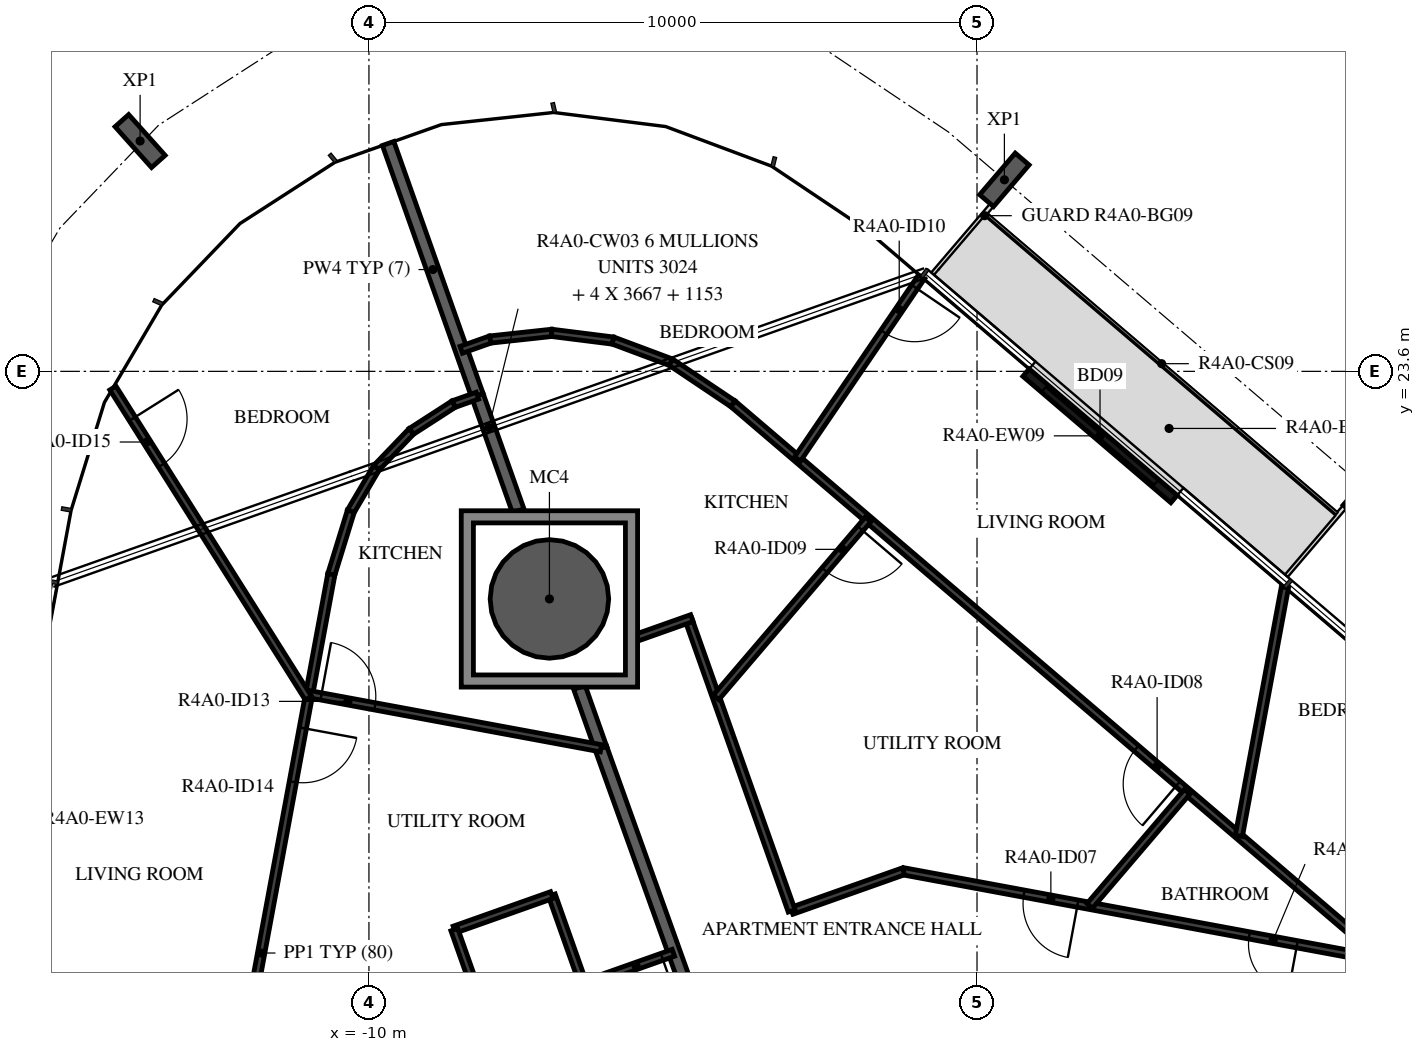
"""IFC4 building model, lengths in metres.
Left out: names, types, materials, properties, quantities, classifications, styles, units other than length and angle.
Written with IfcOpenShell. Run it as: python <this file> out.ifc"""

import sys

from ifc_helpers import new_model, si_unit, direction, frame, frame_2d, origin, origin_2d, place, context, subcontext, project, spatial, polyline, rectangle, hollow_circle, i_section, outline, extrude, element, fill, save


model = new_model("IFC4")
c1 = context("Model", 3, precision=1e-05, world=origin(), true_north=direction((0.0, 1.0)))
c2 = subcontext(c1, "Body", "Model", "MODEL_VIEW")
j1 = project(units=[si_unit("LENGTHUNIT", "METRE"), si_unit("PLANEANGLEUNIT", "RADIAN")], contexts=[c1])
p1 = place(None, origin())
s1 = spatial("IfcSite", under=j1, at=p1, CompositionType="ELEMENT")
p2 = place(p1, origin())
s2 = spatial("IfcBuilding", under=s1, at=p2, CompositionType="ELEMENT")
p3 = place(p2, frame((0.0, 0.0, 158.7)))
s3 = spatial("IfcBuildingStorey", under=s2, at=p3, CompositionType="ELEMENT", Elevation=158.7)
p4 = place(p3, frame((-7.032, 19.858, -0.38), z_axis=(0.0, 0.0, 1.0), x_axis=(1.0, 0.0, 0.0)))
e1 = element("IfcColumn", 1, at=p4, inside=s3, PredefinedType="COLUMN", context=c2, shape_type="SweptSolid", body=[
    extrude(hollow_circle(Radius=0.975, WallThickness=0.045, at=origin_2d()), origin(), (0.0, 0.0, 1.0), 3.5),
])
for number, where, z_axis, x_axis in (
    (2, (6.427, 21.645, -0.38), (0.0, 0.0, 1.0), (0.76, -0.649, 0.0)),
    (3, (0.45, 26.75, -0.38), (0.0, 0.0, 1.0), (0.76, -0.649, 0.0)),
    (4, (-13.763, 27.387, -0.38), (0.0, 0.0, 1.0), (0.746, 0.666, 0.0)),
):
    element("IfcColumn", number, at=place(p3, frame(where, z_axis=z_axis, x_axis=x_axis)), inside=s3, PredefinedType="COLUMN", context=c2, shape_type="SweptSolid", body=[
        extrude(i_section(OverallWidth=0.3, OverallDepth=0.9, WebThickness=0.019, FlangeThickness=0.035, FilletRadius=0.03, at=origin_2d()), origin(), (0.0, 0.0, 1.0), 3.5),
    ])
p5 = place(p3, frame((3.24, 21.5, 0.0), z_axis=(0.0, 0.0, 1.0), x_axis=(-0.760429407868, 0.649420599957, 0.0)))
e5 = element("IfcWall", 5, at=p5, inside=s3, PredefinedType="STANDARD", context=c2, shape_type="SweptSolid", body=[
    extrude(rectangle(XDim=3.2, YDim=0.16, at=frame_2d((1.6, 0.0))), origin(), (0.0, 0.0, 1.0), 3.12),
])
p6 = place(p5, frame((0.4, 0.0, 0.0)))
e6 = element("IfcOpeningElement", 6, at=p6, cuts=e5, PredefinedType="OPENING", context=c2, shape_type="SweptSolid", body=[
    extrude(rectangle(XDim=2.4, YDim=2.4, at=frame_2d((1.2, 1.2))), frame((0.0, 0.09, 0.0), z_axis=(0.0, -1.0, 0.0), x_axis=(1.0, 0.0, 0.0)), (0.0, 0.0, 1.0), 0.18),
])
p7 = place(p3, frame((-6.185, 17.402, 0.0), z_axis=(0.0, 0.0, 1.0), x_axis=(0.337736730281, -0.941240618024, 0.0)))
e7 = element("IfcWall", 7, at=p7, inside=s3, PredefinedType="STANDARD", context=c2, shape_type="SweptSolid", body=[
    extrude(rectangle(XDim=5.068, YDim=0.2, at=frame_2d((2.534, 0.0))), origin(), (0.0, 0.0, 1.0), 3.12),
])
p8 = place(p3, frame((-6.539, 18.403, 0.0), z_axis=(0.0, 0.0, 1.0), x_axis=(0.333625806098, -0.942705585804, 0.0)))
e8 = element("IfcWall", 8, at=p8, inside=s3, PredefinedType="STANDARD", context=c2, shape_type="SweptSolid", body=[
    extrude(rectangle(XDim=1.062, YDim=0.2, at=frame_2d((0.531, 0.0))), origin(), (0.0, 0.0, 1.0), 3.12),
])
p9 = place(p3, frame((-9.684, 27.348, 0.0), z_axis=(0.0, 0.0, 1.0), x_axis=(0.333818381408, -0.942637410797, 0.0)))
e9 = element("IfcWall", 9, at=p9, inside=s3, PredefinedType="STANDARD", context=c2, shape_type="SweptSolid", body=[
    extrude(rectangle(XDim=4.4, YDim=0.2, at=frame_2d((2.2, 0.0))), origin(), (0.0, 0.0, 1.0), 3.12),
])
p10 = place(p3, frame((-8.216, 23.2, 0.0), z_axis=(0.0, 0.0, 1.0), x_axis=(0.333793117913, -0.942646357036, 0.0)))
e10 = element("IfcWall", 10, at=p10, inside=s3, PredefinedType="STANDARD", context=c2, shape_type="SweptSolid", body=[
    extrude(rectangle(XDim=2.008, YDim=0.2, at=frame_2d((1.004, 0.0))), origin(), (0.0, 0.0, 1.0), 3.12),
])
p11 = place(p3, frame((8.702, 12.206, 0.0), z_axis=(0.0, 0.0, 1.0), x_axis=(-0.760401313718, 0.649453494945, 0.0)))
e11 = element("IfcWall", 11, at=p11, inside=s3, PredefinedType="PARTITIONING", context=c2, shape_type="SweptSolid", body=[
    extrude(rectangle(XDim=16.724, YDim=0.12, at=frame_2d((8.362, 0.0))), origin(), (0.0, 0.0, 1.0), 3.12),
])
p12 = place(p11, frame((0.2, 0.0, 0.0)))
e12 = element("IfcOpeningElement", 12, at=p12, cuts=e11, PredefinedType="OPENING", context=c2, shape_type="SweptSolid", body=[
    extrude(rectangle(XDim=0.9, YDim=2.1, at=frame_2d((0.45, 1.05))), frame((0.0, 0.07, 0.0), z_axis=(0.0, -1.0, 0.0), x_axis=(1.0, 0.0, 0.0)), (0.0, 0.0, 1.0), 0.14),
])
p13 = place(p11, frame((7.099, 0.0, 0.0)))
e13 = element("IfcOpeningElement", 13, at=p13, cuts=e11, PredefinedType="OPENING", context=c2, shape_type="SweptSolid", body=[
    extrude(rectangle(XDim=0.9, YDim=2.1, at=frame_2d((0.45, 1.05))), frame((0.0, 0.07, 0.0), z_axis=(0.0, -1.0, 0.0), x_axis=(1.0, 0.0, 0.0)), (0.0, 0.0, 1.0), 0.14),
])
p14 = place(p3, frame((6.641, 13.923, 0.0), z_axis=(0.0, 0.0, 1.0), x_axis=(-0.983250157272, 0.182261153912, 0.0)))
e14 = element("IfcWall", 14, at=p14, inside=s3, PredefinedType="PARTITIONING", context=c2, shape_type="SweptSolid", body=[
    extrude(rectangle(XDim=7.985, YDim=0.12, at=frame_2d((3.992, 0.0))), origin(), (0.0, 0.0, 1.0), 3.12),
])
p15 = place(p14, frame((1.4, 0.0, 0.0)))
e15 = element("IfcOpeningElement", 15, at=p15, cuts=e14, PredefinedType="OPENING", context=c2, shape_type="SweptSolid", body=[
    extrude(rectangle(XDim=0.8, YDim=2.1, at=frame_2d((0.4, 1.05))), frame((0.0, 0.07, 0.0), z_axis=(0.0, -1.0, 0.0), x_axis=(1.0, 0.0, 0.0)), (0.0, 0.0, 1.0), 0.14),
])
p16 = place(p14, frame((5.069, 0.0, 0.0)))
e16 = element("IfcOpeningElement", 16, at=p16, cuts=e14, PredefinedType="OPENING", context=c2, shape_type="SweptSolid", body=[
    extrude(rectangle(XDim=0.9, YDim=2.1, at=frame_2d((0.45, 1.05))), frame((0.0, 0.07, 0.0), z_axis=(0.0, -1.0, 0.0), x_axis=(1.0, 0.0, 0.0)), (0.0, 0.0, 1.0), 0.14),
])
p17 = place(p3, frame((-1.21, 15.378, 0.0), z_axis=(0.0, 0.0, 1.0), x_axis=(-0.942633792474, -0.333828598663, 0.0)))
e17 = element("IfcWall", 17, at=p17, inside=s3, PredefinedType="PARTITIONING", context=c2, shape_type="SweptSolid", body=[
    extrude(rectangle(XDim=1.95, YDim=0.12, at=frame_2d((0.975, 0.0))), origin(), (0.0, 0.0, 1.0), 3.12),
])
p18 = place(p3, frame((-3.048, 14.727, 0.0), z_axis=(0.0, 0.0, 1.0), x_axis=(-0.333811603187, 0.942639811157, 0.0)))
e18 = element("IfcWall", 18, at=p18, inside=s3, PredefinedType="PARTITIONING", context=c2, shape_type="SweptSolid", body=[
    extrude(rectangle(XDim=5.087, YDim=0.12, at=frame_2d((2.543, 0.0))), origin(), (0.0, 0.0, 1.0), 3.12),
])
p19 = place(p3, frame((-4.689, 19.542, 0.0), z_axis=(0.0, 0.0, 1.0), x_axis=(-0.942661851862, -0.33374935662, 0.0)))
e19 = element("IfcWall", 19, at=p19, inside=s3, PredefinedType="PARTITIONING", context=c2, shape_type="SweptSolid", body=[
    extrude(rectangle(XDim=1.017, YDim=0.12, at=frame_2d((0.508, 0.0))), origin(), (0.0, 0.0, 1.0), 3.12),
])
p20 = place(p3, frame((5.063, 20.048, 0.0), z_axis=(0.0, 0.0, 1.0), x_axis=(-0.182238575099, -0.983254342348, 0.0)))
e20 = element("IfcWall", 20, at=p20, inside=s3, PredefinedType="PARTITIONING", context=c2, shape_type="SweptSolid", body=[
    extrude(rectangle(XDim=4.157, YDim=0.12, at=frame_2d((2.079, 0.0))), origin(), (0.0, 0.0, 1.0), 3.12),
])
p21 = place(p3, frame((3.456, 16.686, 0.0), z_axis=(0.0, 0.0, 1.0), x_axis=(-0.649462010463, -0.760394040591, 0.0)))
e21 = element("IfcWall", 21, at=p21, inside=s3, PredefinedType="PARTITIONING", context=c2, shape_type="SweptSolid", body=[
    extrude(rectangle(XDim=2.467, YDim=0.12, at=frame_2d((1.233, 0.0))), origin(), (0.0, 0.0, 1.0), 3.12),
])
p22 = place(p3, frame((-0.914, 25.153, 0.0), z_axis=(0.0, 0.0, 1.0), x_axis=(-0.56264004133, -0.826701992191, 0.0)))
e22 = element("IfcWall", 22, at=p22, inside=s3, PredefinedType="PARTITIONING", context=c2, shape_type="SweptSolid", body=[
    extrude(rectangle(XDim=3.622, YDim=0.12, at=frame_2d((1.811, 0.0))), origin(), (0.0, 0.0, 1.0), 2.73),
])
p23 = place(p22, frame((0.2, 0.0, 0.0)))
e23 = element("IfcOpeningElement", 23, at=p23, cuts=e22, PredefinedType="OPENING", context=c2, shape_type="SweptSolid", body=[
    extrude(rectangle(XDim=0.9, YDim=2.1, at=frame_2d((0.45, 1.05))), frame((0.0, 0.07, 0.0), z_axis=(0.0, -1.0, 0.0), x_axis=(1.0, 0.0, 0.0)), (0.0, 0.0, 1.0), 0.14),
])
p24 = place(p3, frame((-1.79, 21.167, 0.0), z_axis=(0.0, 0.0, 1.0), x_axis=(-0.649427819186, -0.760423242456, 0.0)))
e24 = element("IfcWall", 24, at=p24, inside=s3, PredefinedType="PARTITIONING", context=c2, shape_type="SweptSolid", body=[
    extrude(rectangle(XDim=3.851, YDim=0.12, at=frame_2d((1.926, 0.0))), origin(), (0.0, 0.0, 1.0), 3.12),
])
p25 = place(p24, frame((0.2, 0.0, 0.0)))
e25 = element("IfcOpeningElement", 25, at=p25, cuts=e24, PredefinedType="OPENING", context=c2, shape_type="SweptSolid", body=[
    extrude(rectangle(XDim=0.9, YDim=2.1, at=frame_2d((0.45, 1.05))), frame((0.0, 0.07, 0.0), z_axis=(0.0, -1.0, 0.0), x_axis=(1.0, 0.0, 0.0)), (0.0, 0.0, 1.0), 0.14),
])
p26 = place(p3, frame((-8.483, 23.954, 0.0), z_axis=(0.0, 0.0, 1.0), x_axis=(0.942554725445, 0.334051776738, 0.0)))
e26 = element("IfcWall", 26, at=p26, inside=s3, PredefinedType="PARTITIONING", context=c2, shape_type="SweptSolid", body=[
    extrude(rectangle(XDim=0.508, YDim=0.12, at=frame_2d((0.254, 0.0))), origin(), (0.0, 0.0, 1.0), 3.12),
])
p27 = place(p3, frame((-8.004, 24.124, 0.0), z_axis=(0.0, 0.0, 1.0), x_axis=(0.994216064839, 0.107398400431, 0.0)))
e27 = element("IfcWall", 27, at=p27, inside=s3, PredefinedType="PARTITIONING", context=c2, shape_type="SweptSolid", body=[
    extrude(rectangle(XDim=1.016, YDim=0.12, at=frame_2d((0.508, 0.0))), origin(), (0.0, 0.0, 1.0), 3.12),
])
p28 = place(p3, frame((-6.994, 24.233, 0.0), z_axis=(0.0, 0.0, 1.0), x_axis=(0.992188875952, -0.124744676991, 0.0)))
e28 = element("IfcWall", 28, at=p28, inside=s3, PredefinedType="PARTITIONING", context=c2, shape_type="SweptSolid", body=[
    extrude(rectangle(XDim=1.016, YDim=0.12, at=frame_2d((0.508, 0.0))), origin(), (0.0, 0.0, 1.0), 3.12),
])
p29 = place(p3, frame((-5.986, 24.106, 0.0), z_axis=(0.0, 0.0, 1.0), x_axis=(0.936625084254, -0.350333343469, 0.0)))
e29 = element("IfcWall", 29, at=p29, inside=s3, PredefinedType="PARTITIONING", context=c2, shape_type="SweptSolid", body=[
    extrude(rectangle(XDim=1.016, YDim=0.12, at=frame_2d((0.508, 0.0))), origin(), (0.0, 0.0, 1.0), 3.12),
])
p30 = place(p3, frame((-5.034, 23.75, 0.0), z_axis=(0.0, 0.0, 1.0), x_axis=(0.83070096574, -0.556718874764, 0.0)))
e30 = element("IfcWall", 30, at=p30, inside=s3, PredefinedType="PARTITIONING", context=c2, shape_type="SweptSolid", body=[
    extrude(rectangle(XDim=1.227, YDim=0.12, at=frame_2d((0.614, 0.0))), origin(), (0.0, 0.0, 1.0), 3.12),
])
p31 = place(p3, frame((-4.993, 14.038, 0.0), z_axis=(0.0, 0.0, 1.0), x_axis=(-0.942685371668, -0.333682918418, 0.0)))
e31 = element("IfcWall", 31, at=p31, inside=s3, PredefinedType="PARTITIONING", context=c2, shape_type="SweptSolid", body=[
    extrude(rectangle(XDim=1.569, YDim=0.12, at=frame_2d((0.784, 0.0))), origin(), (0.0, 0.0, 1.0), 3.12),
])
p32 = place(p31, frame((0.2, 0.0, 0.0)))
e32 = element("IfcOpeningElement", 32, at=p32, cuts=e31, PredefinedType="OPENING", context=c2, shape_type="SweptSolid", body=[
    extrude(rectangle(XDim=0.9, YDim=2.1, at=frame_2d((0.45, 1.05))), frame((0.0, 0.07, 0.0), z_axis=(0.0, -1.0, 0.0), x_axis=(1.0, 0.0, 0.0)), (0.0, 0.0, 1.0), 0.14),
])
p33 = place(p3, frame((-6.472, 13.515, 0.0), z_axis=(0.0, 0.0, 1.0), x_axis=(-0.333809516424, 0.942640550127, 0.0)))
e33 = element("IfcWall", 33, at=p33, inside=s3, PredefinedType="PARTITIONING", context=c2, shape_type="SweptSolid", body=[
    extrude(rectangle(XDim=1.562, YDim=0.12, at=frame_2d((0.781, 0.0))), origin(), (0.0, 0.0, 1.0), 3.12),
])
p34 = place(p3, frame((-6.993, 14.987, 0.0), z_axis=(0.0, 0.0, 1.0), x_axis=(-0.942599915297, -0.33392424243, 0.0)))
e34 = element("IfcWall", 34, at=p34, inside=s3, PredefinedType="PARTITIONING", context=c2, shape_type="SweptSolid", body=[
    extrude(rectangle(XDim=1.7, YDim=0.12, at=frame_2d((0.85, 0.0))), origin(), (0.0, 0.0, 1.0), 3.12),
])
p35 = place(p3, frame((-8.596, 14.419, 0.0), z_axis=(0.0, 0.0, 1.0), x_axis=(0.333670576497, -0.942689740254, 0.0)))
e35 = element("IfcWall", 35, at=p35, inside=s3, PredefinedType="PARTITIONING", context=c2, shape_type="SweptSolid", body=[
    extrude(rectangle(XDim=1.562, YDim=0.12, at=frame_2d((0.781, 0.0))), origin(), (0.0, 0.0, 1.0), 3.12),
])
p36 = place(p3, frame((-8.216, 23.2, 0.0), z_axis=(0.0, 0.0, 1.0), x_axis=(-0.942565413363, -0.33402161836, 0.0)))
e36 = element("IfcWall", 36, at=p36, inside=s3, PredefinedType="PARTITIONING", context=c2, shape_type="SweptSolid", body=[
    extrude(rectangle(XDim=0.414, YDim=0.12, at=frame_2d((0.207, 0.0))), origin(), (0.0, 0.0, 1.0), 3.12),
])
for number, where, z_axis, x_axis in (
    (37, (-8.606, 23.062, 0.0), (0.0, 0.0, 1.0), (-0.84, -0.542, 0.0)),
    (38, (-9.303, 22.612, 0.0), (0.0, 0.0, 1.0), (-0.693, -0.721, 0.0)),
    (39, (-9.877, 22.014, 0.0), (0.0, 0.0, 1.0), (-0.508, -0.861, 0.0)),
):
    element("IfcWall", number, at=place(p3, frame(where, z_axis=z_axis, x_axis=x_axis)), inside=s3, PredefinedType="PARTITIONING", context=c2, shape_type="SweptSolid", body=[
        extrude(rectangle(XDim=0.829, YDim=0.12, at=frame_2d((0.415, 0.0))), origin(), (0.0, 0.0, 1.0), 3.12),
    ])
p37 = place(p3, frame((-10.298, 21.3, 0.0), z_axis=(0.0, 0.0, 1.0), x_axis=(-0.295127342945, -0.955457927617, 0.0)))
e40 = element("IfcWall", 40, at=p37, inside=s3, PredefinedType="PARTITIONING", context=c2, shape_type="SweptSolid", body=[
    extrude(rectangle(XDim=1.087, YDim=0.12, at=frame_2d((0.543, 0.0))), origin(), (0.0, 0.0, 1.0), 3.12),
])
p38 = place(p3, frame((-10.618, 20.262, 0.0), z_axis=(0.0, 0.0, 1.0), x_axis=(-0.182222468274, -0.983257327487, 0.0)))
e41 = element("IfcWall", 41, at=p38, inside=s3, PredefinedType="PARTITIONING", context=c2, shape_type="SweptSolid", body=[
    extrude(rectangle(XDim=12.667, YDim=0.12, at=frame_2d((6.333, 0.0))), origin(), (0.0, 0.0, 1.0), 3.12),
])
p39 = place(p38, frame((2.57, 0.0, 0.0)))
e42 = element("IfcOpeningElement", 42, at=p39, cuts=e41, PredefinedType="OPENING", context=c2, shape_type="SweptSolid", body=[
    extrude(rectangle(XDim=0.9, YDim=2.1, at=frame_2d((0.45, 1.05))), frame((0.0, 0.07, 0.0), z_axis=(0.0, -1.0, 0.0), x_axis=(1.0, 0.0, 0.0)), (0.0, 0.0, 1.0), 0.14),
])
p40 = place(p3, frame((-10.984, 18.291, 0.0), z_axis=(0.0, 0.0, 1.0), x_axis=(0.98324782266, -0.182273748068, 0.0)))
e43 = element("IfcWall", 43, at=p40, inside=s3, PredefinedType="PARTITIONING", context=c2, shape_type="SweptSolid", body=[
    extrude(rectangle(XDim=4.881, YDim=0.12, at=frame_2d((2.44, 0.0))), origin(), (0.0, 0.0, 1.0), 3.12),
])
p41 = place(p40, frame((0.2, 0.0, 0.0)))
e44 = element("IfcOpeningElement", 44, at=p41, cuts=e43, PredefinedType="OPENING", context=c2, shape_type="SweptSolid", body=[
    extrude(rectangle(XDim=0.9, YDim=2.1, at=frame_2d((0.45, 1.05))), frame((0.0, 0.07, 0.0), z_axis=(0.0, -1.0, 0.0), x_axis=(1.0, 0.0, 0.0)), (0.0, 0.0, 1.0), 0.14),
])
p42 = place(p3, frame((-14.211, 23.326, 0.0), z_axis=(0.0, 0.0, 1.0), x_axis=(0.533278244906, -0.845939899467, 0.0)))
e45 = element("IfcWall", 45, at=p42, inside=s3, PredefinedType="PARTITIONING", context=c2, shape_type="SweptSolid", body=[
    extrude(rectangle(XDim=6.029, YDim=0.12, at=frame_2d((3.014, 0.0))), origin(), (0.0, 0.0, 1.0), 3.12),
])
p43 = place(p42, frame((0.6, 0.0, 0.0)))
e46 = element("IfcOpeningElement", 46, at=p43, cuts=e45, PredefinedType="OPENING", context=c2, shape_type="SweptSolid", body=[
    extrude(rectangle(XDim=0.9, YDim=2.1, at=frame_2d((0.45, 1.05))), frame((0.0, 0.07, 0.0), z_axis=(0.0, -1.0, 0.0), x_axis=(1.0, 0.0, 0.0)), (0.0, 0.0, 1.0), 0.14),
])
p44 = place(p3, origin())
e47 = element("IfcWall", 47, at=p44, inside=s3, PredefinedType="STANDARD", context=c2, shape_type="SweptSolid", body=[
    extrude(outline(polyline([(-5.582, 21.308), (-5.582, 18.408), (-8.482, 18.408), (-8.482, 21.308), (-5.582, 21.308)]), holes=[polyline([(-8.282, 18.608), (-5.782, 18.608), (-5.782, 21.108), (-8.282, 21.108), (-8.282, 18.608)])]), origin(), (0.0, 0.0, 1.0), 3.12),
])
p45 = place(p6, origin())
e48 = element("IfcDoor", 48, at=p45, inside=s3, OperationType="DOUBLE_DOOR_SLIDING", PredefinedType="DOOR", context=c2, shape_type="SweptSolid", body=[
    extrude(rectangle(XDim=2.4, YDim=2.4, at=frame_2d((1.2, 1.2))), frame((0.0, 0.025, 0.0), z_axis=(0.0, -1.0, 0.0), x_axis=(1.0, 0.0, 0.0)), (0.0, 0.0, 1.0), 0.05),
])
fill(e6, e48)
p46 = place(p15, origin())
e49 = element("IfcDoor", 49, at=p46, inside=s3, OperationType="SINGLE_SWING_RIGHT", PredefinedType="DOOR", context=c2, shape_type="SweptSolid", body=[
    extrude(rectangle(XDim=0.8, YDim=2.1, at=frame_2d((0.4, 1.05))), frame((0.0, 0.025, 0.0), z_axis=(0.0, -1.0, 0.0), x_axis=(1.0, 0.0, 0.0)), (0.0, 0.0, 1.0), 0.05),
])
fill(e15, e49)
p47 = place(p16, origin())
e50 = element("IfcDoor", 50, at=p47, inside=s3, OperationType="SINGLE_SWING_RIGHT", PredefinedType="DOOR", context=c2, shape_type="SweptSolid", body=[
    extrude(rectangle(XDim=0.9, YDim=2.1, at=frame_2d((0.45, 1.05))), frame((0.0, 0.025, 0.0), z_axis=(0.0, -1.0, 0.0), x_axis=(1.0, 0.0, 0.0)), (0.0, 0.0, 1.0), 0.05),
])
fill(e16, e50)
p48 = place(p13, origin())
e51 = element("IfcDoor", 51, at=p48, inside=s3, OperationType="SINGLE_SWING_RIGHT", PredefinedType="DOOR", context=c2, shape_type="SweptSolid", body=[
    extrude(rectangle(XDim=0.9, YDim=2.1, at=frame_2d((0.45, 1.05))), frame((0.0, 0.025, 0.0), z_axis=(0.0, -1.0, 0.0), x_axis=(1.0, 0.0, 0.0)), (0.0, 0.0, 1.0), 0.05),
])
fill(e13, e51)
p49 = place(p25, origin())
e52 = element("IfcDoor", 52, at=p49, inside=s3, OperationType="SINGLE_SWING_RIGHT", PredefinedType="DOOR", context=c2, shape_type="SweptSolid", body=[
    extrude(rectangle(XDim=0.9, YDim=2.1, at=frame_2d((0.45, 1.05))), frame((0.0, 0.025, 0.0), z_axis=(0.0, -1.0, 0.0), x_axis=(1.0, 0.0, 0.0)), (0.0, 0.0, 1.0), 0.05),
])
fill(e25, e52)
p50 = place(p23, origin())
e53 = element("IfcDoor", 53, at=p50, inside=s3, OperationType="SINGLE_SWING_RIGHT", PredefinedType="DOOR", context=c2, shape_type="SweptSolid", body=[
    extrude(rectangle(XDim=0.9, YDim=2.1, at=frame_2d((0.45, 1.05))), frame((0.0, 0.025, 0.0), z_axis=(0.0, -1.0, 0.0), x_axis=(1.0, 0.0, 0.0)), (0.0, 0.0, 1.0), 0.05),
])
fill(e23, e53)
p51 = place(p32, origin())
e54 = element("IfcDoor", 54, at=p51, inside=s3, OperationType="SINGLE_SWING_LEFT", PredefinedType="DOOR", context=c2, shape_type="SweptSolid", body=[
    extrude(rectangle(XDim=0.9, YDim=2.1, at=frame_2d((0.45, 1.05))), frame((0.0, 0.025, 0.0), z_axis=(0.0, -1.0, 0.0), x_axis=(1.0, 0.0, 0.0)), (0.0, 0.0, 1.0), 0.05),
])
fill(e32, e54)
p52 = place(p41, origin())
e55 = element("IfcDoor", 55, at=p52, inside=s3, OperationType="SINGLE_SWING_LEFT", PredefinedType="DOOR", context=c2, shape_type="SweptSolid", body=[
    extrude(rectangle(XDim=0.9, YDim=2.1, at=frame_2d((0.45, 1.05))), frame((0.0, 0.025, 0.0), z_axis=(0.0, -1.0, 0.0), x_axis=(1.0, 0.0, 0.0)), (0.0, 0.0, 1.0), 0.05),
])
fill(e44, e55)
p53 = place(p39, origin())
e56 = element("IfcDoor", 56, at=p53, inside=s3, OperationType="SINGLE_SWING_LEFT", PredefinedType="DOOR", context=c2, shape_type="SweptSolid", body=[
    extrude(rectangle(XDim=0.9, YDim=2.1, at=frame_2d((0.45, 1.05))), frame((0.0, 0.025, 0.0), z_axis=(0.0, -1.0, 0.0), x_axis=(1.0, 0.0, 0.0)), (0.0, 0.0, 1.0), 0.05),
])
fill(e42, e56)
p54 = place(p43, origin())
e57 = element("IfcDoor", 57, at=p54, inside=s3, OperationType="SINGLE_SWING_LEFT", PredefinedType="DOOR", context=c2, shape_type="SweptSolid", body=[
    extrude(rectangle(XDim=0.9, YDim=2.1, at=frame_2d((0.45, 1.05))), frame((0.0, 0.025, 0.0), z_axis=(0.0, -1.0, 0.0), x_axis=(1.0, 0.0, 0.0)), (0.0, 0.0, 1.0), 0.05),
])
fill(e46, e57)
save(model, sys.argv[1])
